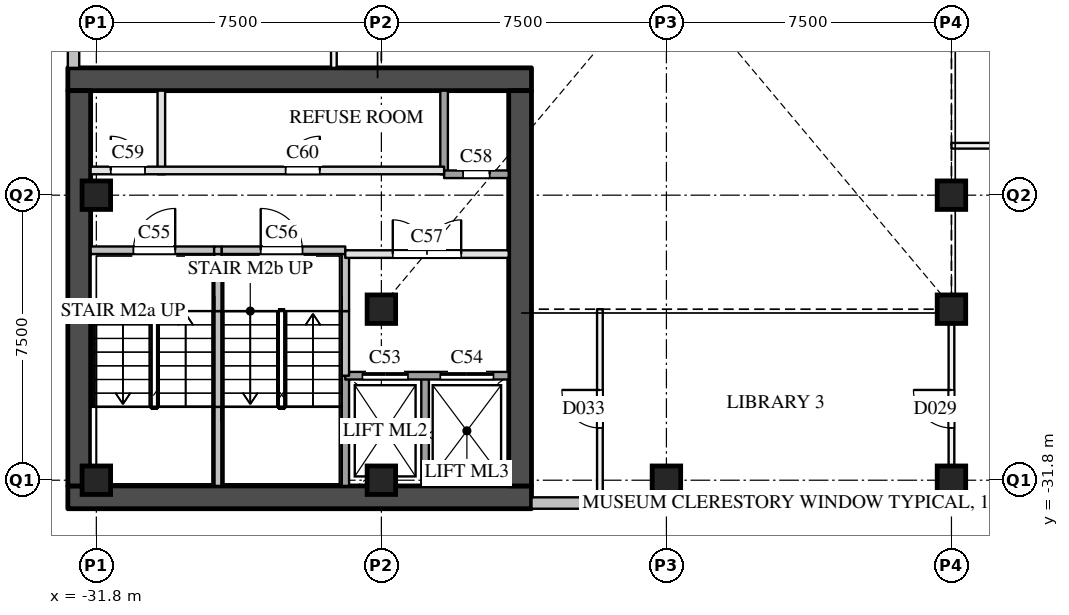
"""IFC4 building model, lengths in metres.
Left out: names, types, materials, properties, quantities, classifications, styles, units other than length and angle.
Written with IfcOpenShell. Run it as: python <this file> out.ifc"""

import sys

from ifc_helpers import new_model, si_unit, direction, frame, frame_2d, origin, origin_2d, place, context, subcontext, project, spatial, rectangle, extrude, element, fill, save


model = new_model("IFC4")
c1 = context("Model", 3, precision=1e-05, world=origin(), true_north=direction((0.0, 1.0)))
c2 = subcontext(c1, "Body", "Model", "MODEL_VIEW")
j1 = project(units=[si_unit("LENGTHUNIT", "METRE"), si_unit("PLANEANGLEUNIT", "RADIAN")], contexts=[c1])
p1 = place(None, origin())
s1 = spatial("IfcSite", under=j1, at=p1, CompositionType="ELEMENT")
p2 = place(p1, origin())
s2 = spatial("IfcBuilding", under=s1, at=p2, CompositionType="ELEMENT")
p3 = place(p2, frame((0.0, 0.0, 21.0)))
s3 = spatial("IfcBuildingStorey", under=s2, at=p3, CompositionType="ELEMENT", Elevation=21.0)
for number, where, z_axis, x_axis in (
    (1, (-31.8, -31.8, 0.0), (0.0, 0.0, 1.0), (1.0, 0.0, 0.0)),
    (2, (-31.8, -24.3, 0.0), (0.0, 0.0, 1.0), (1.0, 0.0, 0.0)),
    (3, (-24.3, -31.8, 0.0), (0.0, 0.0, 1.0), (1.0, 0.0, 0.0)),
    (4, (-16.8, -31.8, 0.0), (0.0, 0.0, 1.0), (1.0, 0.0, 0.0)),
    (5, (-9.3, -31.8, 0.0), (0.0, 0.0, 1.0), (1.0, 0.0, 0.0)),
    (6, (-9.3, -24.3, 0.0), (0.0, 0.0, 1.0), (1.0, 0.0, 0.0)),
    (7, (-24.3, -27.3, 0.0), (0.0, 0.0, 1.0), (1.0, 0.0, 0.0)),
    (8, (-9.3, -27.3, 0.0), (0.0, 0.0, 1.0), (1.0, 0.0, 0.0)),
):
    element("IfcColumn", number, at=place(p3, frame(where, z_axis=z_axis, x_axis=x_axis)), inside=s3, PredefinedType="COLUMN", context=c2, shape_type="SweptSolid", body=[
        extrude(rectangle(XDim=0.75, YDim=0.75, at=origin_2d()), origin(), (0.0, 0.0, 1.0), 5.0),
    ])
p4 = place(p3, frame((-20.35, -32.4, 0.0), z_axis=(0.0, 0.0, 1.0), x_axis=(1.0, 0.0, 0.0)))
e9 = element("IfcWall", 9, at=p4, inside=s3, PredefinedType="SOLIDWALL", context=c2, shape_type="SweptSolid", body=[
    extrude(rectangle(XDim=3.55, YDim=0.3, at=frame_2d((1.775, 0.0))), origin(), (0.0, 0.0, 1.0), 4.59),
])
p5 = place(p3, frame((-16.8, -32.4, 0.0), z_axis=(0.0, 0.0, 1.0), x_axis=(1.0, 0.0, 0.0)))
e10 = element("IfcWall", 10, at=p5, inside=s3, PredefinedType="SOLIDWALL", context=c2, shape_type="SweptSolid", body=[
    extrude(rectangle(XDim=7.5, YDim=0.3, at=frame_2d((3.75, 0.0))), origin(), (0.0, 0.0, 1.0), 4.59),
])
p6 = place(p5, frame((1.95, 0.0, 2.4)))
e11 = element("IfcOpeningElement", 11, at=p6, cuts=e10, PredefinedType="OPENING", context=c2, shape_type="SweptSolid", body=[
    extrude(rectangle(XDim=3.6, YDim=1.2, at=frame_2d((1.8, 0.6))), frame((0.0, 0.16, 0.0), z_axis=(0.0, -1.0, 0.0), x_axis=(1.0, 0.0, 0.0)), (0.0, 0.0, 1.0), 0.32),
])
p7 = place(p3, frame((-9.3, -32.4, 0.0), z_axis=(0.0, 0.0, 1.0), x_axis=(1.0, 0.0, 0.0)))
e12 = element("IfcWall", 12, at=p7, inside=s3, PredefinedType="SOLIDWALL", context=c2, shape_type="SweptSolid", body=[
    extrude(rectangle(XDim=7.5, YDim=0.3, at=frame_2d((3.75, 0.0))), origin(), (0.0, 0.0, 1.0), 4.59),
])
p8 = place(p7, frame((1.95, 0.0, 2.4)))
e13 = element("IfcOpeningElement", 13, at=p8, cuts=e12, PredefinedType="OPENING", context=c2, shape_type="SweptSolid", body=[
    extrude(rectangle(XDim=3.6, YDim=1.2, at=frame_2d((1.8, 0.6))), frame((0.0, 0.16, 0.0), z_axis=(0.0, -1.0, 0.0), x_axis=(1.0, 0.0, 0.0)), (0.0, 0.0, 1.0), 0.32),
])
p9 = place(p3, frame((-32.4, -16.8, 0.0), z_axis=(0.0, 0.0, 1.0), x_axis=(0.0, -1.0, 0.0)))
e14 = element("IfcWall", 14, at=p9, inside=s3, PredefinedType="SOLIDWALL", context=c2, shape_type="SweptSolid", body=[
    extrude(rectangle(XDim=4.15, YDim=0.3, at=frame_2d((2.075, 0.0))), origin(), (0.0, 0.0, 1.0), 4.59),
])
for number, where, z_axis, x_axis in (
    (15, (-32.55, -32.25, 0.0), (0.0, 0.0, 1.0), (1.0, 0.0, 0.0)),
    (16, (-32.55, -21.25, 0.0), (0.0, 0.0, 1.0), (1.0, 0.0, 0.0)),
):
    element("IfcWall", number, at=place(p3, frame(where, z_axis=z_axis, x_axis=x_axis)), inside=s3, PredefinedType="SHEAR", context=c2, shape_type="SweptSolid", body=[
        extrude(rectangle(XDim=12.2, YDim=0.6, at=frame_2d((6.1, 0.0))), origin(), (0.0, 0.0, 1.0), 4.55),
    ])
for number, where, z_axis, x_axis in (
    (17, (-32.25, -31.95, 0.0), (0.0, 0.0, 1.0), (0.0, 1.0, 0.0)),
    (18, (-20.65, -31.95, 0.0), (0.0, 0.0, 1.0), (0.0, 1.0, 0.0)),
):
    element("IfcWall", number, at=place(p3, frame(where, z_axis=z_axis, x_axis=x_axis)), inside=s3, PredefinedType="SHEAR", context=c2, shape_type="SweptSolid", body=[
        extrude(rectangle(XDim=10.4, YDim=0.6, at=frame_2d((5.2, 0.0))), origin(), (0.0, 0.0, 1.0), 4.55),
    ])
p10 = place(p3, frame((-30.09, -23.75, 0.0), z_axis=(0.0, 0.0, 1.0), x_axis=(0.0, 1.0, 0.0)))
e19 = element("IfcWall", 19, at=p10, inside=s3, PredefinedType="PARTITIONING", context=c2, shape_type="SweptSolid", body=[
    extrude(rectangle(XDim=2.2, YDim=0.2, at=frame_2d((1.1, 0.0))), origin(), (0.0, 0.0, 1.0), 4.55),
])
p11 = place(p3, frame((-28.6, -31.95, 0.0), z_axis=(0.0, 0.0, 1.0), x_axis=(0.0, 1.0, 0.0)))
e20 = element("IfcWall", 20, at=p11, inside=s3, PredefinedType="SOLIDWALL", context=c2, shape_type="SweptSolid", body=[
    extrude(rectangle(XDim=2.08, YDim=0.2, at=frame_2d((1.04, 0.0))), origin(), (0.0, 0.0, 1.0), 4.55),
])
p12 = place(p3, frame((-28.6, -29.87, 0.0), z_axis=(0.0, 0.0, 1.0), x_axis=(0.0, 1.0, 0.0)))
e21 = element("IfcWall", 21, at=p12, inside=s3, PredefinedType="SOLIDWALL", context=c2, shape_type="SweptSolid", body=[
    extrude(rectangle(XDim=2.52, YDim=0.2, at=frame_2d((1.26, 0.0))), origin(), (0.0, 0.0, 1.0), 4.55),
])
p13 = place(p3, frame((-28.6, -27.35, 0.0), z_axis=(0.0, 0.0, 1.0), x_axis=(0.0, 1.0, 0.0)))
e22 = element("IfcWall", 22, at=p13, inside=s3, PredefinedType="SOLIDWALL", context=c2, shape_type="SweptSolid", body=[
    extrude(rectangle(XDim=1.6, YDim=0.2, at=frame_2d((0.8, 0.0))), origin(), (0.0, 0.0, 1.0), 4.55),
])
p14 = place(p3, frame((-25.25, -31.95, 0.0), z_axis=(0.0, 0.0, 1.0), x_axis=(0.0, 1.0, 0.0)))
e23 = element("IfcWall", 23, at=p14, inside=s3, PredefinedType="SOLIDWALL", context=c2, shape_type="SweptSolid", body=[
    extrude(rectangle(XDim=2.9, YDim=0.2, at=frame_2d((1.45, 0.0))), origin(), (0.0, 0.0, 1.0), 4.55),
])
p15 = place(p3, frame((-25.25, -29.05, 0.0), z_axis=(0.0, 0.0, 1.0), x_axis=(0.0, 1.0, 0.0)))
e24 = element("IfcWall", 24, at=p15, inside=s3, PredefinedType="SOLIDWALL", context=c2, shape_type="SweptSolid", body=[
    extrude(rectangle(XDim=1.7, YDim=0.2, at=frame_2d((0.85, 0.0))), origin(), (0.0, 0.0, 1.0), 4.55),
])
p16 = place(p3, frame((-25.25, -27.35, 0.0), z_axis=(0.0, 0.0, 1.0), x_axis=(0.0, 1.0, 0.0)))
e25 = element("IfcWall", 25, at=p16, inside=s3, PredefinedType="SOLIDWALL", context=c2, shape_type="SweptSolid", body=[
    extrude(rectangle(XDim=1.6, YDim=0.2, at=frame_2d((0.8, 0.0))), origin(), (0.0, 0.0, 1.0), 4.55),
])
p17 = place(p3, frame((-23.15, -31.95, 0.0), z_axis=(0.0, 0.0, 1.0), x_axis=(0.0, 1.0, 0.0)))
e26 = element("IfcWall", 26, at=p17, inside=s3, PredefinedType="SOLIDWALL", context=c2, shape_type="SweptSolid", body=[
    extrude(rectangle(XDim=2.9, YDim=0.2, at=frame_2d((1.45, 0.0))), origin(), (0.0, 0.0, 1.0), 4.55),
])
p18 = place(p3, frame((-22.65, -23.75, 0.0), z_axis=(0.0, 0.0, 1.0), x_axis=(0.0, 1.0, 0.0)))
e27 = element("IfcWall", 27, at=p18, inside=s3, PredefinedType="SOLIDWALL", context=c2, shape_type="SweptSolid", body=[
    extrude(rectangle(XDim=2.2, YDim=0.2, at=frame_2d((1.1, 0.0))), origin(), (0.0, 0.0, 1.0), 4.55),
])
p19 = place(p3, frame((-25.25, -29.05, 0.0), z_axis=(0.0, 0.0, 1.0), x_axis=(1.0, 0.0, 0.0)))
e28 = element("IfcWall", 28, at=p19, inside=s3, PredefinedType="SOLIDWALL", context=c2, shape_type="SweptSolid", body=[
    extrude(rectangle(XDim=4.3, YDim=0.2, at=frame_2d((2.15, 0.0))), origin(), (0.0, 0.0, 1.0), 4.55),
])
p20 = place(p19, frame((0.45, 0.0, 0.0)))
e29 = element("IfcOpeningElement", 29, at=p20, cuts=e28, PredefinedType="OPENING", context=c2, shape_type="SweptSolid", body=[
    extrude(rectangle(XDim=1.2, YDim=2.1, at=frame_2d((0.6, 1.05))), frame((0.0, 0.11, 0.0), z_axis=(0.0, -1.0, 0.0), x_axis=(1.0, 0.0, 0.0)), (0.0, 0.0, 1.0), 0.22),
])
p21 = place(p19, frame((2.5, 0.0, 0.0)))
e30 = element("IfcOpeningElement", 30, at=p21, cuts=e28, PredefinedType="OPENING", context=c2, shape_type="SweptSolid", body=[
    extrude(rectangle(XDim=1.4, YDim=2.1, at=frame_2d((0.7, 1.05))), frame((0.0, 0.11, 0.0), z_axis=(0.0, -1.0, 0.0), x_axis=(1.0, 0.0, 0.0)), (0.0, 0.0, 1.0), 0.22),
])
p22 = place(p3, frame((-25.25, -25.85, 0.0), z_axis=(0.0, 0.0, 1.0), x_axis=(1.0, 0.0, 0.0)))
e31 = element("IfcWall", 31, at=p22, inside=s3, PredefinedType="PARTITIONING", context=c2, shape_type="SweptSolid", body=[
    extrude(rectangle(XDim=4.3, YDim=0.2, at=frame_2d((2.15, 0.0))), origin(), (0.0, 0.0, 1.0), 4.55),
])
p23 = place(p22, frame((1.25, 0.0, 0.0)))
e32 = element("IfcOpeningElement", 32, at=p23, cuts=e31, PredefinedType="OPENING", context=c2, shape_type="SweptSolid", body=[
    extrude(rectangle(XDim=1.8, YDim=2.1, at=frame_2d((0.9, 1.05))), frame((0.0, 0.11, 0.0), z_axis=(0.0, -1.0, 0.0), x_axis=(1.0, 0.0, 0.0)), (0.0, 0.0, 1.0), 0.22),
])
p24 = place(p3, frame((-31.95, -25.75, 0.0), z_axis=(0.0, 0.0, 1.0), x_axis=(1.0, 0.0, 0.0)))
e33 = element("IfcWall", 33, at=p24, inside=s3, PredefinedType="SOLIDWALL", context=c2, shape_type="SweptSolid", body=[
    extrude(rectangle(XDim=3.25, YDim=0.2, at=frame_2d((1.625, 0.0))), origin(), (0.0, 0.0, 1.0), 4.55),
])
p25 = place(p24, frame((1.125, 0.0, 0.0)))
e34 = element("IfcOpeningElement", 34, at=p25, cuts=e33, PredefinedType="OPENING", context=c2, shape_type="SweptSolid", body=[
    extrude(rectangle(XDim=1.1, YDim=2.1, at=frame_2d((0.55, 1.05))), frame((0.0, 0.11, 0.0), z_axis=(0.0, -1.0, 0.0), x_axis=(1.0, 0.0, 0.0)), (0.0, 0.0, 1.0), 0.22),
])
p26 = place(p3, frame((-28.7, -25.75, 0.0), z_axis=(0.0, 0.0, 1.0), x_axis=(1.0, 0.0, 0.0)))
e35 = element("IfcWall", 35, at=p26, inside=s3, PredefinedType="SOLIDWALL", context=c2, shape_type="SweptSolid", body=[
    extrude(rectangle(XDim=0.2, YDim=0.2, at=frame_2d((0.1, 0.0))), origin(), (0.0, 0.0, 1.0), 4.55),
])
p27 = place(p3, frame((-28.5, -25.75, 0.0), z_axis=(0.0, 0.0, 1.0), x_axis=(1.0, 0.0, 0.0)))
e36 = element("IfcWall", 36, at=p27, inside=s3, PredefinedType="SOLIDWALL", context=c2, shape_type="SweptSolid", body=[
    extrude(rectangle(XDim=3.25, YDim=0.2, at=frame_2d((1.625, 0.0))), origin(), (0.0, 0.0, 1.0), 4.55),
])
p28 = place(p27, frame((1.025, 0.0, 0.0)))
e37 = element("IfcOpeningElement", 37, at=p28, cuts=e36, PredefinedType="OPENING", context=c2, shape_type="SweptSolid", body=[
    extrude(rectangle(XDim=1.1, YDim=2.1, at=frame_2d((0.55, 1.05))), frame((0.0, 0.11, 0.0), z_axis=(0.0, -1.0, 0.0), x_axis=(1.0, 0.0, 0.0)), (0.0, 0.0, 1.0), 0.22),
])
p29 = place(p3, frame((-31.95, -23.65, 0.0), z_axis=(0.0, 0.0, 1.0), x_axis=(1.0, 0.0, 0.0)))
e38 = element("IfcWall", 38, at=p29, inside=s3, PredefinedType="PARTITIONING", context=c2, shape_type="SweptSolid", body=[
    extrude(rectangle(XDim=9.3, YDim=0.2, at=frame_2d((4.65, 0.0))), origin(), (0.0, 0.0, 1.0), 4.55),
])
p30 = place(p29, frame((0.53, 0.0, 0.0)))
e39 = element("IfcOpeningElement", 39, at=p30, cuts=e38, PredefinedType="OPENING", context=c2, shape_type="SweptSolid", body=[
    extrude(rectangle(XDim=0.9, YDim=2.1, at=frame_2d((0.45, 1.05))), frame((0.0, 0.11, 0.0), z_axis=(0.0, -1.0, 0.0), x_axis=(1.0, 0.0, 0.0)), (0.0, 0.0, 1.0), 0.22),
])
p31 = place(p29, frame((5.13, 0.0, 0.0)))
e40 = element("IfcOpeningElement", 40, at=p31, cuts=e38, PredefinedType="OPENING", context=c2, shape_type="SweptSolid", body=[
    extrude(rectangle(XDim=0.9, YDim=2.1, at=frame_2d((0.45, 1.05))), frame((0.0, 0.11, 0.0), z_axis=(0.0, -1.0, 0.0), x_axis=(1.0, 0.0, 0.0)), (0.0, 0.0, 1.0), 0.22),
])
p32 = place(p3, frame((-22.65, -23.75, 0.0), z_axis=(0.0, 0.0, 1.0), x_axis=(1.0, 0.0, 0.0)))
e41 = element("IfcWall", 41, at=p32, inside=s3, PredefinedType="SOLIDWALL", context=c2, shape_type="SweptSolid", body=[
    extrude(rectangle(XDim=1.7, YDim=0.2, at=frame_2d((0.85, 0.0))), origin(), (0.0, 0.0, 1.0), 4.55),
])
p33 = place(p32, frame((0.5, 0.0, 0.0)))
e42 = element("IfcOpeningElement", 42, at=p33, cuts=e41, PredefinedType="OPENING", context=c2, shape_type="SweptSolid", body=[
    extrude(rectangle(XDim=0.7, YDim=2.1, at=frame_2d((0.35, 1.05))), frame((0.0, 0.11, 0.0), z_axis=(0.0, -1.0, 0.0), x_axis=(1.0, 0.0, 0.0)), (0.0, 0.0, 1.0), 0.22),
])
p34 = place(p3, frame((-9.3, -23.0, 0.0), z_axis=(0.0, 0.0, 1.0), x_axis=(1.0, 0.0, 0.0)))
e43 = element("IfcWall", 43, at=p34, inside=s3, PredefinedType="PARTITIONING", context=c2, shape_type="SweptSolid", body=[
    extrude(rectangle(XDim=11.05, YDim=0.15, at=frame_2d((5.525, 0.0))), origin(), (0.0, 0.0, 1.0), 3.79),
])
p35 = place(p34, frame((5.025, 0.0, 0.0)))
e44 = element("IfcOpeningElement", 44, at=p35, cuts=e43, PredefinedType="OPENING", context=c2, shape_type="SweptSolid", body=[
    extrude(rectangle(XDim=1.0, YDim=2.1, at=frame_2d((0.5, 1.05))), frame((0.0, 0.085, 0.0), z_axis=(0.0, -1.0, 0.0), x_axis=(1.0, 0.0, 0.0)), (0.0, 0.0, 1.0), 0.17),
])
p36 = place(p3, frame((-25.55, -20.95, 0.0), z_axis=(0.0, 0.0, 1.0), x_axis=(0.0, 1.0, 0.0)))
e45 = element("IfcWall", 45, at=p36, inside=s3, PredefinedType="PARTITIONING", context=c2, shape_type="SweptSolid", body=[
    extrude(rectangle(XDim=11.65, YDim=0.15, at=frame_2d((5.825, 0.0))), origin(), (0.0, 0.0, 1.0), 3.79),
])
p37 = place(p36, frame((5.325, 0.0, 0.0)))
e46 = element("IfcOpeningElement", 46, at=p37, cuts=e45, PredefinedType="OPENING", context=c2, shape_type="SweptSolid", body=[
    extrude(rectangle(XDim=1.0, YDim=2.1, at=frame_2d((0.5, 1.05))), frame((0.0, 0.085, 0.0), z_axis=(0.0, -1.0, 0.0), x_axis=(1.0, 0.0, 0.0)), (0.0, 0.0, 1.0), 0.17),
])
p38 = place(p3, frame((-18.55, -32.55, 0.0), z_axis=(0.0, 0.0, 1.0), x_axis=(0.0, 1.0, 0.0)))
e47 = element("IfcWall", 47, at=p38, inside=s3, PredefinedType="PARTITIONING", context=c2, shape_type="SweptSolid", body=[
    extrude(rectangle(XDim=5.25, YDim=0.15, at=frame_2d((2.625, 0.0))), origin(), (0.0, 0.0, 1.0), 4.55),
])
p39 = place(p38, frame((2.125, 0.0, 0.0)))
e48 = element("IfcOpeningElement", 48, at=p39, cuts=e47, PredefinedType="OPENING", context=c2, shape_type="SweptSolid", body=[
    extrude(rectangle(XDim=1.0, YDim=2.1, at=frame_2d((0.5, 1.05))), frame((0.0, 0.085, 0.0), z_axis=(0.0, -1.0, 0.0), x_axis=(1.0, 0.0, 0.0)), (0.0, 0.0, 1.0), 0.17),
])
p40 = place(p3, frame((-9.3, -32.55, 0.0), z_axis=(0.0, 0.0, 1.0), x_axis=(0.0, 1.0, 0.0)))
e49 = element("IfcWall", 49, at=p40, inside=s3, PredefinedType="PARTITIONING", context=c2, shape_type="SweptSolid", body=[
    extrude(rectangle(XDim=5.25, YDim=0.15, at=frame_2d((2.625, 0.0))), origin(), (0.0, 0.0, 1.0), 3.79),
])
p41 = place(p40, frame((2.125, 0.0, 0.0)))
e50 = element("IfcOpeningElement", 50, at=p41, cuts=e49, PredefinedType="OPENING", context=c2, shape_type="SweptSolid", body=[
    extrude(rectangle(XDim=1.0, YDim=2.1, at=frame_2d((0.5, 1.05))), frame((0.0, 0.085, 0.0), z_axis=(0.0, -1.0, 0.0), x_axis=(1.0, 0.0, 0.0)), (0.0, 0.0, 1.0), 0.17),
])
p42 = place(p6, origin())
e51 = element("IfcWindow", 51, at=p42, inside=s3, PartitioningType="SINGLE_PANEL", PredefinedType="WINDOW", context=c2, shape_type="SweptSolid", body=[
    extrude(rectangle(XDim=3.6, YDim=1.2, at=frame_2d((1.8, 0.6))), frame((0.0, 0.03, 0.0), z_axis=(0.0, -1.0, 0.0), x_axis=(1.0, 0.0, 0.0)), (0.0, 0.0, 1.0), 0.06),
])
fill(e11, e51)
p43 = place(p20, origin())
e52 = element("IfcDoor", 52, at=p43, inside=s3, OperationType="SLIDING_TO_LEFT", PredefinedType="DOOR", context=c2, shape_type="SweptSolid", body=[
    extrude(rectangle(XDim=1.2, YDim=2.1, at=frame_2d((0.6, 1.05))), frame((0.0, 0.025, 0.0), z_axis=(0.0, -1.0, 0.0), x_axis=(1.0, 0.0, 0.0)), (0.0, 0.0, 1.0), 0.05),
])
fill(e29, e52)
p44 = place(p21, origin())
e53 = element("IfcDoor", 53, at=p44, inside=s3, OperationType="SLIDING_TO_LEFT", PredefinedType="DOOR", context=c2, shape_type="SweptSolid", body=[
    extrude(rectangle(XDim=1.4, YDim=2.1, at=frame_2d((0.7, 1.05))), frame((0.0, 0.025, 0.0), z_axis=(0.0, -1.0, 0.0), x_axis=(1.0, 0.0, 0.0)), (0.0, 0.0, 1.0), 0.05),
])
fill(e30, e53)
p45 = place(p25, origin())
e54 = element("IfcDoor", 54, at=p45, inside=s3, OperationType="SINGLE_SWING_RIGHT", PredefinedType="DOOR", context=c2, shape_type="SweptSolid", body=[
    extrude(rectangle(XDim=1.1, YDim=2.1, at=frame_2d((0.55, 1.05))), frame((0.0, 0.025, 0.0), z_axis=(0.0, -1.0, 0.0), x_axis=(1.0, 0.0, 0.0)), (0.0, 0.0, 1.0), 0.05),
])
fill(e34, e54)
p46 = place(p28, origin())
e55 = element("IfcDoor", 55, at=p46, inside=s3, OperationType="SINGLE_SWING_LEFT", PredefinedType="DOOR", context=c2, shape_type="SweptSolid", body=[
    extrude(rectangle(XDim=1.1, YDim=2.1, at=frame_2d((0.55, 1.05))), frame((0.0, 0.025, 0.0), z_axis=(0.0, -1.0, 0.0), x_axis=(1.0, 0.0, 0.0)), (0.0, 0.0, 1.0), 0.05),
])
fill(e37, e55)
p47 = place(p23, origin())
e56 = element("IfcDoor", 56, at=p47, inside=s3, OperationType="DOUBLE_DOOR_SINGLE_SWING", PredefinedType="DOOR", context=c2, shape_type="SweptSolid", body=[
    extrude(rectangle(XDim=1.8, YDim=2.1, at=frame_2d((0.9, 1.05))), frame((0.0, 0.025, 0.0), z_axis=(0.0, -1.0, 0.0), x_axis=(1.0, 0.0, 0.0)), (0.0, 0.0, 1.0), 0.05),
])
fill(e32, e56)
p48 = place(p33, origin())
e57 = element("IfcDoor", 57, at=p48, inside=s3, OperationType="SINGLE_SWING_RIGHT", PredefinedType="DOOR", context=c2, shape_type="SweptSolid", body=[
    extrude(rectangle(XDim=0.7, YDim=2.1, at=frame_2d((0.35, 1.05))), frame((0.0, 0.025, 0.0), z_axis=(0.0, -1.0, 0.0), x_axis=(1.0, 0.0, 0.0)), (0.0, 0.0, 1.0), 0.05),
])
fill(e42, e57)
p49 = place(p30, origin())
e58 = element("IfcDoor", 58, at=p49, inside=s3, OperationType="SINGLE_SWING_LEFT", PredefinedType="DOOR", context=c2, shape_type="SweptSolid", body=[
    extrude(rectangle(XDim=0.9, YDim=2.1, at=frame_2d((0.45, 1.05))), frame((0.0, 0.025, 0.0), z_axis=(0.0, -1.0, 0.0), x_axis=(1.0, 0.0, 0.0)), (0.0, 0.0, 1.0), 0.05),
])
fill(e39, e58)
p50 = place(p31, origin())
e59 = element("IfcDoor", 59, at=p50, inside=s3, OperationType="SINGLE_SWING_RIGHT", PredefinedType="DOOR", context=c2, shape_type="SweptSolid", body=[
    extrude(rectangle(XDim=0.9, YDim=2.1, at=frame_2d((0.45, 1.05))), frame((0.0, 0.025, 0.0), z_axis=(0.0, -1.0, 0.0), x_axis=(1.0, 0.0, 0.0)), (0.0, 0.0, 1.0), 0.05),
])
fill(e40, e59)
p51 = place(p41, origin())
e60 = element("IfcDoor", 60, at=p51, inside=s3, OperationType="SINGLE_SWING_RIGHT", PredefinedType="DOOR", context=c2, shape_type="SweptSolid", body=[
    extrude(rectangle(XDim=1.0, YDim=2.1, at=frame_2d((0.5, 1.05))), frame((0.0, 0.025, 0.0), z_axis=(0.0, -1.0, 0.0), x_axis=(1.0, 0.0, 0.0)), (0.0, 0.0, 1.0), 0.05),
])
fill(e50, e60)
p52 = place(p39, origin())
e61 = element("IfcDoor", 61, at=p52, inside=s3, OperationType="SINGLE_SWING_RIGHT", PredefinedType="DOOR", context=c2, shape_type="SweptSolid", body=[
    extrude(rectangle(XDim=1.0, YDim=2.1, at=frame_2d((0.5, 1.05))), frame((0.0, 0.025, 0.0), z_axis=(0.0, -1.0, 0.0), x_axis=(1.0, 0.0, 0.0)), (0.0, 0.0, 1.0), 0.05),
])
fill(e48, e61)
save(model, sys.argv[1])
